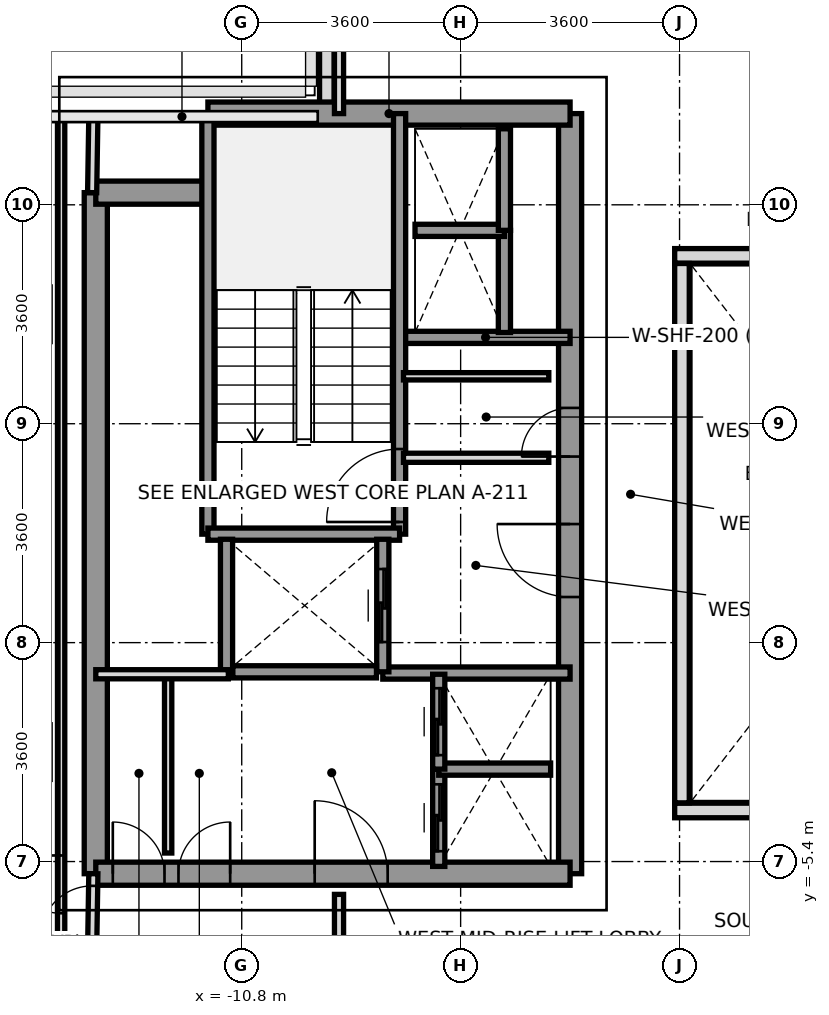
"""IFC4 building model, lengths in metres.
Left out: names, types, materials, properties, quantities, classifications, styles, units other than length and angle.
Written with IfcOpenShell. Run it as: python <this file> out.ifc"""

import sys

from ifc_helpers import new_model, si_unit, direction, frame, frame_2d, origin, place, context, subcontext, project, spatial, rectangle, extrude, source, transform, mapped, element, fill, save


model = new_model("IFC4")
c1 = context("Model", 3, precision=1e-05, world=origin(), true_north=direction((0.0, 1.0)))
c2 = subcontext(c1, "Body", "Model", "MODEL_VIEW")
j1 = project(units=[si_unit("LENGTHUNIT", "METRE"), si_unit("PLANEANGLEUNIT", "RADIAN")], contexts=[c1])
p1 = place(None, origin())
s1 = spatial("IfcSite", under=j1, at=p1, CompositionType="ELEMENT")
p2 = place(p1, origin())
s2 = spatial("IfcBuilding", under=s1, at=p2, CompositionType="ELEMENT")
p3 = place(p2, frame((0.0, 0.0, 163.8)))
s3 = spatial("IfcBuildingStorey", under=s2, at=p3, CompositionType="ELEMENT", Elevation=163.8)
p4 = place(p3, frame((-9.4, 6.953, 0.0), z_axis=(0.0, 0.0, 1.0), x_axis=(0.0, 1.0, 0.0)))
e1 = element("IfcWall", 1, at=p4, inside=s3, PredefinedType="PARAPET", context=c2, shape_type="SweptSolid", body=[
    extrude(rectangle(XDim=1.594, YDim=0.24, at=frame_2d((0.797, 0.0))), origin(), (0.0, 0.0, 1.0), 1.15),
])
p5 = place(p3, frame((-13.2, -5.6, 0.0), z_axis=(0.0, 0.0, 1.0), x_axis=(0.0, 1.0, 0.0)))
e2 = element("IfcWall", 2, at=p5, inside=s3, PredefinedType="SHEAR", context=c2, shape_type="SweptSolid", body=[
    extrude(rectangle(XDim=11.2, YDim=0.38, at=frame_2d((5.6, 0.0))), origin(), (0.0, 0.0, 1.0), 3.2),
])
p6 = place(p3, frame((-5.4, -5.6, 0.0), z_axis=(0.0, 0.0, 1.0), x_axis=(0.0, 1.0, 0.0)))
e3 = element("IfcWall", 3, at=p6, inside=s3, PredefinedType="SHEAR", context=c2, shape_type="SweptSolid", body=[
    extrude(rectangle(XDim=12.5, YDim=0.38, at=frame_2d((6.25, 0.0))), origin(), (0.0, 0.0, 1.0), 3.2),
])
p7 = place(p6, frame((4.55, 0.0, 0.0)))
e4 = element("IfcOpeningElement", 4, at=p7, cuts=e3, PredefinedType="OPENING", context=c2, shape_type="SweptSolid", body=[
    extrude(rectangle(XDim=1.2, YDim=2.2, at=frame_2d((0.6, 1.1))), frame((0.0, 0.2, 0.0), z_axis=(0.0, -1.0, 0.0), x_axis=(1.0, 0.0, 0.0)), (0.0, 0.0, 1.0), 0.4),
])
p8 = place(p6, frame((6.86, 0.0, 0.0)))
e5 = element("IfcOpeningElement", 5, at=p8, cuts=e3, PredefinedType="OPENING", context=c2, shape_type="SweptSolid", body=[
    extrude(rectangle(XDim=0.8, YDim=2.1, at=frame_2d((0.4, 1.05))), frame((0.0, 0.2, 0.0), z_axis=(0.0, -1.0, 0.0), x_axis=(1.0, 0.0, 0.0)), (0.0, 0.0, 1.0), 0.4),
])
p9 = place(p3, frame((-11.356, 6.9, 0.0), z_axis=(0.0, 0.0, 1.0), x_axis=(1.0, 0.0, 0.0)))
e6 = element("IfcWall", 6, at=p9, inside=s3, PredefinedType="SHEAR", context=c2, shape_type="SweptSolid", body=[
    extrude(rectangle(XDim=5.956, YDim=0.38, at=frame_2d((2.978, 0.0))), origin(), (0.0, 0.0, 1.0), 3.2),
])
p10 = place(p3, frame((-13.2, 5.6, 0.0), z_axis=(0.0, 0.0, 1.0), x_axis=(1.0, 0.0, 0.0)))
e7 = element("IfcWall", 7, at=p10, inside=s3, PredefinedType="SHEAR", context=c2, shape_type="SweptSolid", body=[
    extrude(rectangle(XDim=1.844, YDim=0.38, at=frame_2d((0.922, 0.0))), origin(), (0.0, 0.0, 1.0), 3.2),
])
p11 = place(p3, frame((-13.2, -5.6, 0.0), z_axis=(0.0, 0.0, 1.0), x_axis=(1.0, 0.0, 0.0)))
e8 = element("IfcWall", 8, at=p11, inside=s3, PredefinedType="SHEAR", context=c2, shape_type="SweptSolid", body=[
    extrude(rectangle(XDim=7.8, YDim=0.38, at=frame_2d((3.9, 0.0))), origin(), (0.0, 0.0, 1.0), 3.2),
])
p12 = place(p11, frame((3.6, 0.0, 0.0)))
e9 = element("IfcOpeningElement", 9, at=p12, cuts=e8, PredefinedType="OPENING", context=c2, shape_type="SweptSolid", body=[
    extrude(rectangle(XDim=1.2, YDim=2.2, at=frame_2d((0.6, 1.1))), frame((0.0, 0.2, 0.0), z_axis=(0.0, -1.0, 0.0), x_axis=(1.0, 0.0, 0.0)), (0.0, 0.0, 1.0), 0.4),
])
p13 = place(p11, frame((0.28, 0.0, 0.0)))
e10 = element("IfcOpeningElement", 10, at=p13, cuts=e8, PredefinedType="OPENING", context=c2, shape_type="SweptSolid", body=[
    extrude(rectangle(XDim=0.85, YDim=2.1, at=frame_2d((0.425, 1.05))), frame((0.0, 0.2, 0.0), z_axis=(0.0, -1.0, 0.0), x_axis=(1.0, 0.0, 0.0)), (0.0, 0.0, 1.0), 0.4),
])
p14 = place(p11, frame((1.36, 0.0, 0.0)))
e11 = element("IfcOpeningElement", 11, at=p14, cuts=e8, PredefinedType="OPENING", context=c2, shape_type="SweptSolid", body=[
    extrude(rectangle(XDim=0.85, YDim=2.1, at=frame_2d((0.425, 1.05))), frame((0.0, 0.2, 0.0), z_axis=(0.0, -1.0, 0.0), x_axis=(1.0, 0.0, 0.0)), (0.0, 0.0, 1.0), 0.4),
])
p15 = place(p3, frame((-8.18, 3.22, 0.0), z_axis=(0.0, 0.0, 1.0), x_axis=(1.0, 0.0, 0.0)))
e12 = element("IfcWall", 12, at=p15, inside=s3, PredefinedType="SOLIDWALL", context=c2, shape_type="SweptSolid", body=[
    extrude(rectangle(XDim=2.78, YDim=0.2, at=frame_2d((1.39, 0.0))), origin(), (0.0, 0.0, 1.0), 3.2),
])
p16 = place(p3, frame((-8.48, -2.3, 0.0), z_axis=(0.0, 0.0, 1.0), x_axis=(1.0, 0.0, 0.0)))
e13 = element("IfcWall", 13, at=p16, inside=s3, PredefinedType="SOLIDWALL", context=c2, shape_type="SweptSolid", body=[
    extrude(rectangle(XDim=3.08, YDim=0.2, at=frame_2d((1.54, 0.0))), origin(), (0.0, 0.0, 1.0), 3.2),
])
p17 = place(p3, frame((-8.204, -0.016, 0.0), z_axis=(0.0, 0.0, 1.0), x_axis=(0.0, 1.0, 0.0)))
e14 = element("IfcWall", 14, at=p17, inside=s3, PredefinedType="SOLIDWALL", context=c2, shape_type="SweptSolid", body=[
    extrude(rectangle(XDim=6.916, YDim=0.2, at=frame_2d((3.458, 0.0))), origin(), (0.0, 0.0, 1.0), 3.2),
])
p18 = place(p17, frame((0.2, 0.0, 0.0)))
e15 = element("IfcOpeningElement", 15, at=p18, cuts=e14, PredefinedType="OPENING", context=c2, shape_type="SweptSolid", body=[
    extrude(rectangle(XDim=1.2, YDim=2.2, at=frame_2d((0.6, 1.1))), frame((0.0, 0.11, 0.0), z_axis=(0.0, -1.0, 0.0), x_axis=(1.0, 0.0, 0.0)), (0.0, 0.0, 1.0), 0.22),
])
p19 = place(p3, frame((-11.356, -0.016, 0.0), z_axis=(0.0, 0.0, 1.0), x_axis=(0.0, 1.0, 0.0)))
e16 = element("IfcWall", 16, at=p19, inside=s3, PredefinedType="SOLIDWALL", context=c2, shape_type="SweptSolid", body=[
    extrude(rectangle(XDim=6.916, YDim=0.2, at=frame_2d((3.458, 0.0))), origin(), (0.0, 0.0, 1.0), 3.2),
])
p20 = place(p3, frame((-11.356, -0.016, 0.0), z_axis=(0.0, 0.0, 1.0), x_axis=(1.0, 0.0, 0.0)))
e17 = element("IfcWall", 17, at=p20, inside=s3, PredefinedType="SOLIDWALL", context=c2, shape_type="SweptSolid", body=[
    extrude(rectangle(XDim=3.152, YDim=0.2, at=frame_2d((1.576, 0.0))), origin(), (0.0, 0.0, 1.0), 3.2),
])
p21 = place(p3, frame((-11.05, -2.28, 0.0), z_axis=(0.0, 0.0, 1.0), x_axis=(0.0, 1.0, 0.0)))
e18 = element("IfcWall", 18, at=p21, inside=s3, PredefinedType="SOLIDWALL", context=c2, shape_type="SweptSolid", body=[
    extrude(rectangle(XDim=2.18, YDim=0.2, at=frame_2d((1.09, 0.0))), origin(), (0.0, 0.0, 1.0), 3.2),
])
p22 = place(p3, frame((-8.48, -2.28, 0.0), z_axis=(0.0, 0.0, 1.0), x_axis=(0.0, 1.0, 0.0)))
e19 = element("IfcWall", 19, at=p22, inside=s3, PredefinedType="SOLIDWALL", context=c2, shape_type="SweptSolid", body=[
    extrude(rectangle(XDim=2.18, YDim=0.2, at=frame_2d((1.09, 0.0))), origin(), (0.0, 0.0, 1.0), 3.2),
])
p23 = place(p22, frame((0.49, 0.0, 0.0)))
e20 = element("IfcOpeningElement", 20, at=p23, cuts=e19, PredefinedType="OPENING", context=c2, shape_type="SweptSolid", body=[
    extrude(rectangle(XDim=1.2, YDim=2.2, at=frame_2d((0.6, 1.1))), frame((0.0, 0.11, 0.0), z_axis=(0.0, -1.0, 0.0), x_axis=(1.0, 0.0, 0.0)), (0.0, 0.0, 1.0), 0.22),
])
p24 = place(p3, frame((-10.946, -2.28, 0.0), z_axis=(0.0, 0.0, 1.0), x_axis=(1.0, 0.0, 0.0)))
e21 = element("IfcWall", 21, at=p24, inside=s3, PredefinedType="SOLIDWALL", context=c2, shape_type="SweptSolid", body=[
    extrude(rectangle(XDim=2.362, YDim=0.2, at=frame_2d((1.181, 0.0))), origin(), (0.0, 0.0, 1.0), 3.2),
])
p25 = place(p3, frame((-7.56, -5.48, 0.0), z_axis=(0.0, 0.0, 1.0), x_axis=(0.0, 1.0, 0.0)))
e22 = element("IfcWall", 22, at=p25, inside=s3, PredefinedType="SOLIDWALL", context=c2, shape_type="SweptSolid", body=[
    extrude(rectangle(XDim=1.6, YDim=0.2, at=frame_2d((0.8, 0.0))), origin(), (0.0, 0.0, 1.0), 3.2),
])
p26 = place(p25, frame((0.25, 0.0, 0.0)))
e23 = element("IfcOpeningElement", 23, at=p26, cuts=e22, PredefinedType="OPENING", context=c2, shape_type="SweptSolid", body=[
    extrude(rectangle(XDim=1.1, YDim=2.2, at=frame_2d((0.55, 1.1))), frame((0.0, 0.11, 0.0), z_axis=(0.0, -1.0, 0.0), x_axis=(1.0, 0.0, 0.0)), (0.0, 0.0, 1.0), 0.22),
])
p27 = place(p3, frame((-7.56, -3.88, 0.0), z_axis=(0.0, 0.0, 1.0), x_axis=(1.0, 0.0, 0.0)))
e24 = element("IfcWall", 24, at=p27, inside=s3, PredefinedType="SOLIDWALL", context=c2, shape_type="SweptSolid", body=[
    extrude(rectangle(XDim=1.84, YDim=0.2, at=frame_2d((0.92, 0.0))), origin(), (0.0, 0.0, 1.0), 3.2),
])
p28 = place(p3, frame((-7.56, -3.88, 0.0), z_axis=(0.0, 0.0, 1.0), x_axis=(0.0, 1.0, 0.0)))
e25 = element("IfcWall", 25, at=p28, inside=s3, PredefinedType="SOLIDWALL", context=c2, shape_type="SweptSolid", body=[
    extrude(rectangle(XDim=1.56, YDim=0.2, at=frame_2d((0.78, 0.0))), origin(), (0.0, 0.0, 1.0), 3.2),
])
p29 = place(p28, frame((0.23, 0.0, 0.0)))
e26 = element("IfcOpeningElement", 26, at=p29, cuts=e25, PredefinedType="OPENING", context=c2, shape_type="SweptSolid", body=[
    extrude(rectangle(XDim=1.1, YDim=2.2, at=frame_2d((0.55, 1.1))), frame((0.0, 0.11, 0.0), z_axis=(0.0, -1.0, 0.0), x_axis=(1.0, 0.0, 0.0)), (0.0, 0.0, 1.0), 0.22),
])
p30 = place(p3, frame((-6.48, 3.3, 0.0), z_axis=(0.0, 0.0, 1.0), x_axis=(0.0, 1.0, 0.0)))
e27 = element("IfcWall", 27, at=p30, inside=s3, PredefinedType="SOLIDWALL", context=c2, shape_type="SweptSolid", body=[
    extrude(rectangle(XDim=1.68, YDim=0.2, at=frame_2d((0.84, 0.0))), origin(), (0.0, 0.0, 1.0), 3.2),
])
p31 = place(p3, frame((-7.95, 4.98, 0.0), z_axis=(0.0, 0.0, 1.0), x_axis=(1.0, 0.0, 0.0)))
e28 = element("IfcWall", 28, at=p31, inside=s3, PredefinedType="SOLIDWALL", context=c2, shape_type="SweptSolid", body=[
    extrude(rectangle(XDim=1.47, YDim=0.2, at=frame_2d((0.735, 0.0))), origin(), (0.0, 0.0, 1.0), 3.2),
])
p32 = place(p3, frame((-6.48, 4.98, 0.0), z_axis=(0.0, 0.0, 1.0), x_axis=(0.0, 1.0, 0.0)))
e29 = element("IfcWall", 29, at=p32, inside=s3, PredefinedType="SOLIDWALL", context=c2, shape_type="SweptSolid", body=[
    extrude(rectangle(XDim=1.67, YDim=0.2, at=frame_2d((0.835, 0.0))), origin(), (0.0, 0.0, 1.0), 3.2),
])
p33 = place(p3, frame((-8.14, 1.24, 0.0), z_axis=(0.0, 0.0, 1.0), x_axis=(1.0, 0.0, 0.0)))
e30 = element("IfcWall", 30, at=p33, inside=s3, PredefinedType="PARTITIONING", context=c2, shape_type="SweptSolid", body=[
    extrude(rectangle(XDim=2.39, YDim=0.15, at=frame_2d((1.195, 0.0))), origin(), (0.0, 0.0, 1.0), 2.3),
])
p34 = place(p3, frame((-8.14, 2.58, 0.0), z_axis=(0.0, 0.0, 1.0), x_axis=(1.0, 0.0, 0.0)))
e31 = element("IfcWall", 31, at=p34, inside=s3, PredefinedType="PARTITIONING", context=c2, shape_type="SweptSolid", body=[
    extrude(rectangle(XDim=2.39, YDim=0.12, at=frame_2d((1.195, 0.0))), origin(), (0.0, 0.0, 1.0), 2.3),
])
p35 = place(p3, frame((-12.01, -5.26, 0.0), z_axis=(0.0, 0.0, 1.0), x_axis=(0.0, 1.0, 0.0)))
e32 = element("IfcWall", 32, at=p35, inside=s3, PredefinedType="PARTITIONING", context=c2, shape_type="SweptSolid", body=[
    extrude(rectangle(XDim=2.94, YDim=0.12, at=frame_2d((1.47, 0.0))), origin(), (0.0, 0.0, 1.0), 3.2),
])
p36 = place(p3, frame((-13.2, -2.32, 0.0), z_axis=(0.0, 0.0, 1.0), x_axis=(1.0, 0.0, 0.0)))
e33 = element("IfcWall", 33, at=p36, inside=s3, PredefinedType="PARTITIONING", context=c2, shape_type="SweptSolid", body=[
    extrude(rectangle(XDim=2.18, YDim=0.15, at=frame_2d((1.09, 0.0))), origin(), (0.0, 0.0, 1.0), 3.2),
])
p37 = place(p3, frame((-9.2, 6.9, 0.0), z_axis=(0.0, 0.0, 1.0), x_axis=(0.0, 1.0, 0.0)))
e34 = element("IfcWall", 34, at=p37, inside=s3, PredefinedType="PARTITIONING", context=c2, shape_type="SweptSolid", body=[
    extrude(rectangle(XDim=8.78, YDim=0.15, at=frame_2d((4.39, 0.0))), origin(), (0.0, 0.0, 1.0), 2.75),
])
p38 = place(p3, frame((-9.2, -15.68, 0.0), z_axis=(0.0, 0.0, 1.0), x_axis=(0.0, 1.0, 0.0)))
e35 = element("IfcWall", 35, at=p38, inside=s3, PredefinedType="PARTITIONING", context=c2, shape_type="SweptSolid", body=[
    extrude(rectangle(XDim=9.74, YDim=0.15, at=frame_2d((4.87, 0.0))), origin(), (0.0, 0.0, 1.0), 2.75),
])
p39 = place(p3, frame((-13.26, 5.6, 0.0), z_axis=(0.0, 0.0, 1.0), x_axis=(0.016013571389, 0.999871774545, 0.0)))
e36 = element("IfcWall", 36, at=p39, inside=s3, PredefinedType="PARTITIONING", context=c2, shape_type="SweptSolid", body=[
    extrude(rectangle(XDim=1.25, YDim=0.15, at=frame_2d((0.625, 0.0))), origin(), (0.0, 0.0, 1.0), 3.2),
])
p40 = place(p3, frame((-13.26, -6.85, 0.0), z_axis=(0.0, 0.0, 1.0), x_axis=(0.016013571389, 0.999871774545, 0.0)))
e37 = element("IfcWall", 37, at=p40, inside=s3, PredefinedType="PARTITIONING", context=c2, shape_type="SweptSolid", body=[
    extrude(rectangle(XDim=1.25, YDim=0.15, at=frame_2d((0.625, 0.0))), origin(), (0.0, 0.0, 1.0), 3.2),
])
p41 = place(p40, frame((0.2, 0.0, 0.0)))
e38 = element("IfcOpeningElement", 38, at=p41, cuts=e37, PredefinedType="OPENING", context=c2, shape_type="SweptSolid", body=[
    extrude(rectangle(XDim=0.85, YDim=2.1, at=frame_2d((0.425, 1.05))), frame((0.0, 0.085, 0.0), z_axis=(0.0, -1.0, 0.0), x_axis=(1.0, 0.0, 0.0)), (0.0, 0.0, 1.0), 0.17),
])
p42 = place(p3, frame((-13.77, -6.85, 0.0), z_axis=(0.0, 0.0, 1.0), x_axis=(0.0, 1.0, 0.0)))
e39 = element("IfcWall", 39, at=p42, inside=s3, PredefinedType="PARTITIONING", context=c2, shape_type="SweptSolid", body=[
    extrude(rectangle(XDim=13.7, YDim=0.12, at=frame_2d((6.85, 0.0))), origin(), (0.0, 0.0, 1.0), 2.87),
])
p43 = place(p42, frame((0.6, 0.0, 0.0)))
e40 = element("IfcOpeningElement", 40, at=p43, cuts=e39, PredefinedType="OPENING", context=c2, shape_type="SweptSolid", body=[
    extrude(rectangle(XDim=0.95, YDim=2.15, at=frame_2d((0.475, 1.075))), frame((0.0, 0.07, 0.0), z_axis=(0.0, -1.0, 0.0), x_axis=(1.0, 0.0, 0.0)), (0.0, 0.0, 1.0), 0.14),
])
for number, where, z_axis, x_axis in (
    (41, (-3.68, -4.56, 0.0), (0.0, 0.0, 1.0), (1.0, 0.0, 0.0)),
    (42, (-3.68, 4.56, 0.0), (0.0, 0.0, 1.0), (1.0, 0.0, 0.0)),
):
    element("IfcWall", number, at=place(p3, frame(where, z_axis=z_axis, x_axis=x_axis)), inside=s3, PredefinedType="PARAPET", context=c2, shape_type="SweptSolid", body=[
        extrude(rectangle(XDim=7.36, YDim=0.24, at=frame_2d((3.68, 0.0))), origin(), (0.0, 0.0, 1.0), 1.15),
    ])
p44 = place(p3, frame((-3.56, -4.435, 0.0), z_axis=(0.0, 0.0, 1.0), x_axis=(0.0, 1.0, 0.0)))
e43 = element("IfcWall", 43, at=p44, inside=s3, PredefinedType="PARAPET", context=c2, shape_type="SweptSolid", body=[
    extrude(rectangle(XDim=8.87, YDim=0.24, at=frame_2d((4.435, 0.0))), origin(), (0.0, 0.0, 1.0), 1.15),
])
m1 = source(origin(), c2, "Body", "SweptSolid", [
    extrude(rectangle(XDim=1.2, YDim=2.2, at=frame_2d((0.6, 1.1))), frame((0.0, 0.025, 0.0), z_axis=(0.0, -1.0, 0.0), x_axis=(1.0, 0.0, 0.0)), (0.0, 0.0, 1.0), 0.05),
])
p45 = place(p18, origin())
e44 = element("IfcDoor", 44, at=p45, inside=s3, OperationType="SINGLE_SWING_LEFT", PredefinedType="DOOR", context=c2, shape_type="MappedRepresentation", body=[
    mapped(m1, transform((0.0, 0.0, 0.0), x_axis=(1.0, 0.0, 0.0), y_axis=(0.0, 1.0, 0.0), z_axis=(0.0, 0.0, 1.0), scale=1.0)),
])
fill(e15, e44)
p46 = place(p7, origin())
e45 = element("IfcDoor", 45, at=p46, inside=s3, OperationType="SINGLE_SWING_RIGHT", PredefinedType="DOOR", context=c2, shape_type="MappedRepresentation", body=[
    mapped(m1, transform((0.0, 0.0, 0.0), x_axis=(1.0, 0.0, 0.0), y_axis=(0.0, 1.0, 0.0), z_axis=(0.0, 0.0, 1.0), scale=1.0)),
])
fill(e4, e45)
p47 = place(p12, origin())
e46 = element("IfcDoor", 46, at=p47, inside=s3, OperationType="SINGLE_SWING_LEFT", PredefinedType="DOOR", context=c2, shape_type="MappedRepresentation", body=[
    mapped(m1, transform((0.0, 0.0, 0.0), x_axis=(1.0, 0.0, 0.0), y_axis=(0.0, 1.0, 0.0), z_axis=(0.0, 0.0, 1.0), scale=1.0)),
])
fill(e9, e46)
m2 = source(origin(), c2, "Body", "SweptSolid", [
    extrude(rectangle(XDim=0.8, YDim=2.1, at=frame_2d((0.4, 1.05))), frame((0.0, 0.025, 0.0), z_axis=(0.0, -1.0, 0.0), x_axis=(1.0, 0.0, 0.0)), (0.0, 0.0, 1.0), 0.05),
])
p48 = place(p8, origin())
e47 = element("IfcDoor", 47, at=p48, inside=s3, OperationType="SINGLE_SWING_LEFT", PredefinedType="DOOR", context=c2, shape_type="MappedRepresentation", body=[
    mapped(m2, transform((0.0, 0.0, 0.0), x_axis=(1.0, 0.0, 0.0), y_axis=(0.0, 1.0, 0.0), z_axis=(0.0, 0.0, 1.0), scale=1.0)),
])
fill(e5, e47)
m3 = source(origin(), c2, "Body", "SweptSolid", [
    extrude(rectangle(XDim=0.85, YDim=2.1, at=frame_2d((0.425, 1.05))), frame((0.0, 0.025, 0.0), z_axis=(0.0, -1.0, 0.0), x_axis=(1.0, 0.0, 0.0)), (0.0, 0.0, 1.0), 0.05),
])
p49 = place(p13, origin())
e48 = element("IfcDoor", 48, at=p49, inside=s3, OperationType="SINGLE_SWING_LEFT", PredefinedType="DOOR", context=c2, shape_type="MappedRepresentation", body=[
    mapped(m3, transform((0.0, 0.0, 0.0), x_axis=(1.0, 0.0, 0.0), y_axis=(0.0, 1.0, 0.0), z_axis=(0.0, 0.0, 1.0), scale=1.0)),
])
fill(e10, e48)
p50 = place(p14, origin())
e49 = element("IfcDoor", 49, at=p50, inside=s3, OperationType="SINGLE_SWING_RIGHT", PredefinedType="DOOR", context=c2, shape_type="MappedRepresentation", body=[
    mapped(m3, transform((0.0, 0.0, 0.0), x_axis=(1.0, 0.0, 0.0), y_axis=(0.0, 1.0, 0.0), z_axis=(0.0, 0.0, 1.0), scale=1.0)),
])
fill(e11, e49)
p51 = place(p23, origin())
e50 = element("IfcDoor", 50, at=p51, inside=s3, OperationType="SLIDING_TO_RIGHT", PredefinedType="DOOR", context=c2, shape_type="MappedRepresentation", body=[
    mapped(m1, transform((0.0, 0.0, 0.0), x_axis=(1.0, 0.0, 0.0), y_axis=(0.0, 1.0, 0.0), z_axis=(0.0, 0.0, 1.0), scale=1.0)),
])
fill(e20, e50)
m4 = source(origin(), c2, "Body", "SweptSolid", [
    extrude(rectangle(XDim=1.1, YDim=2.2, at=frame_2d((0.55, 1.1))), frame((0.0, 0.025, 0.0), z_axis=(0.0, -1.0, 0.0), x_axis=(1.0, 0.0, 0.0)), (0.0, 0.0, 1.0), 0.05),
])
p52 = place(p26, origin())
e51 = element("IfcDoor", 51, at=p52, inside=s3, OperationType="SLIDING_TO_LEFT", PredefinedType="DOOR", context=c2, shape_type="MappedRepresentation", body=[
    mapped(m4, transform((0.0, 0.0, 0.0), x_axis=(1.0, 0.0, 0.0), y_axis=(0.0, 1.0, 0.0), z_axis=(0.0, 0.0, 1.0), scale=1.0)),
])
fill(e23, e51)
p53 = place(p29, origin())
e52 = element("IfcDoor", 52, at=p53, inside=s3, OperationType="SLIDING_TO_LEFT", PredefinedType="DOOR", context=c2, shape_type="MappedRepresentation", body=[
    mapped(m4, transform((0.0, 0.0, 0.0), x_axis=(1.0, 0.0, 0.0), y_axis=(0.0, 1.0, 0.0), z_axis=(0.0, 0.0, 1.0), scale=1.0)),
])
fill(e26, e52)
m5 = source(origin(), c2, "Body", "SweptSolid", [
    extrude(rectangle(XDim=0.95, YDim=2.15, at=frame_2d((0.475, 1.075))), frame((0.0, 0.025, 0.0), z_axis=(0.0, -1.0, 0.0), x_axis=(1.0, 0.0, 0.0)), (0.0, 0.0, 1.0), 0.05),
])
p54 = place(p43, origin())
e53 = element("IfcDoor", 53, at=p54, inside=s3, OperationType="SINGLE_SWING_RIGHT", PredefinedType="DOOR", context=c2, shape_type="MappedRepresentation", body=[
    mapped(m5, transform((0.0, 0.0, 0.0), x_axis=(1.0, 0.0, 0.0), y_axis=(0.0, 1.0, 0.0), z_axis=(0.0, 0.0, 1.0), scale=1.0)),
])
fill(e40, e53)
p55 = place(p41, origin())
e54 = element("IfcDoor", 54, at=p55, inside=s3, OperationType="SINGLE_SWING_LEFT", PredefinedType="DOOR", context=c2, shape_type="MappedRepresentation", body=[
    mapped(m3, transform((0.0, 0.0, 0.0), x_axis=(1.0, 0.0, 0.0), y_axis=(0.0, 1.0, 0.0), z_axis=(0.0, 0.0, 1.0), scale=1.0)),
])
fill(e38, e54)
save(model, sys.argv[1])
